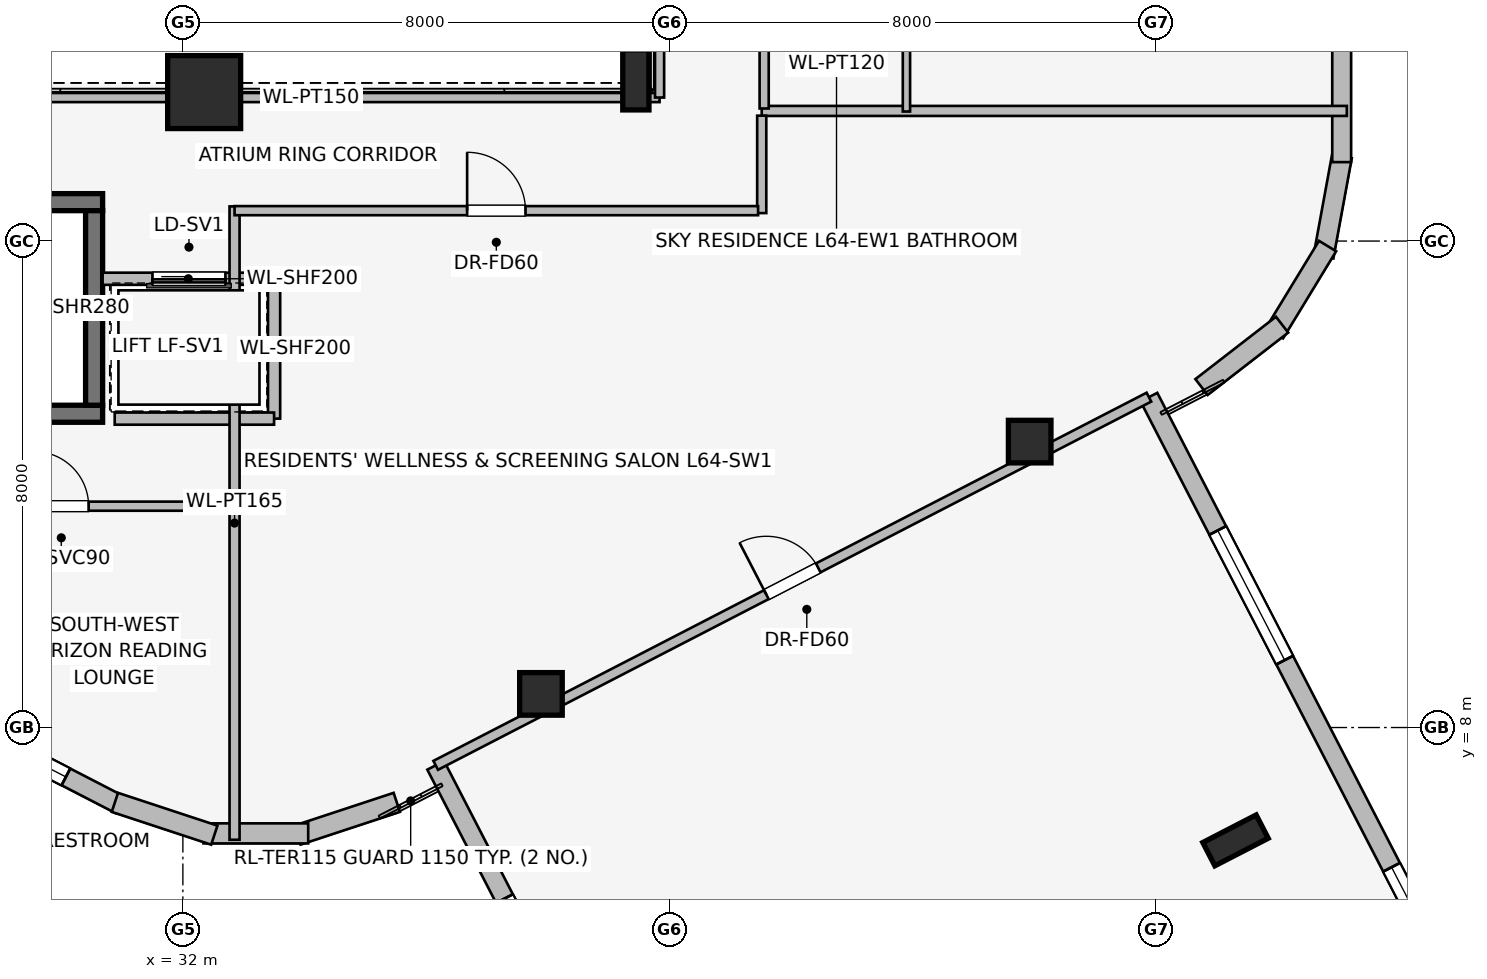
"""IFC4 building model, lengths in metres.
Left out: names, types, materials, properties, quantities, classifications, styles, units other than length and angle.
Written with IfcOpenShell. Run it as: python <this file> out.ifc"""

import sys

from ifc_helpers import new_model, si_unit, direction, frame, frame_2d, origin, origin_2d, place, context, subcontext, project, spatial, rectangle, i_section, extrude, element, fill, save


model = new_model("IFC4")
c1 = context("Model", 3, precision=1e-05, world=origin(), true_north=direction((0.0, 1.0)))
c2 = subcontext(c1, "Body", "Model", "MODEL_VIEW")
j1 = project(units=[si_unit("LENGTHUNIT", "METRE"), si_unit("PLANEANGLEUNIT", "RADIAN")], contexts=[c1])
p1 = place(None, origin())
s1 = spatial("IfcSite", under=j1, at=p1, CompositionType="ELEMENT")
p2 = place(p1, origin())
s2 = spatial("IfcBuilding", under=s1, at=p2, CompositionType="ELEMENT")
p3 = place(p2, frame((0.0, 0.0, 234.8)))
s3 = spatial("IfcBuildingStorey", under=s2, at=p3, CompositionType="ELEMENT", Elevation=234.8)
p4 = place(p3, frame((22.32, 13.16, 0.0), z_axis=(0.0, 0.0, 1.0), x_axis=(1.0, 0.0, 0.0)))
e1 = element("IfcWall", 1, at=p4, inside=s3, PredefinedType="SHEAR", context=c2, shape_type="SweptSolid", body=[
    extrude(rectangle(XDim=8.36, YDim=0.28, at=frame_2d((4.18, 0.0))), origin(), (0.0, 0.0, 1.0), 3.55),
])
p5 = place(p3, frame((30.68, 16.64, 0.0), z_axis=(0.0, 0.0, 1.0), x_axis=(-1.0, 0.0, 0.0)))
e2 = element("IfcWall", 2, at=p5, inside=s3, PredefinedType="SHEAR", context=c2, shape_type="SweptSolid", body=[
    extrude(rectangle(XDim=8.36, YDim=0.28, at=frame_2d((4.18, 0.0))), origin(), (0.0, 0.0, 1.0), 3.55),
])
p6 = place(p5, frame((6.08, 0.0, 0.0)))
e3 = element("IfcOpeningElement", 3, at=p6, cuts=e2, PredefinedType="OPENING", context=c2, shape_type="SweptSolid", body=[
    extrude(rectangle(XDim=1.05, YDim=2.0, at=frame_2d((0.525, 1.0))), frame((0.0, 0.15, 0.0), z_axis=(0.0, -1.0, 0.0), x_axis=(1.0, 0.0, 0.0)), (0.0, 0.0, 1.0), 0.3),
])
p7 = place(p3, frame((30.54, 13.3, 0.0), z_axis=(0.0, 0.0, 1.0), x_axis=(0.0, 1.0, 0.0)))
e4 = element("IfcWall", 4, at=p7, inside=s3, PredefinedType="SHEAR", context=c2, shape_type="SweptSolid", body=[
    extrude(rectangle(XDim=3.2, YDim=0.28, at=frame_2d((1.6, 0.0))), origin(), (0.0, 0.0, 1.0), 3.55),
])
p8 = place(p3, frame((32.35, 18.45, 0.0), z_axis=(0.0, 0.0, 1.0), x_axis=(1.0, 0.0, 0.0)))
e5 = element("IfcColumn", 5, at=p8, inside=s3, PredefinedType="COLUMN", context=c2, shape_type="SweptSolid", body=[
    extrude(rectangle(XDim=1.2, YDim=1.2, at=origin_2d()), origin(), (0.0, 0.0, 1.0), 3.55),
])
for number, where, z_axis, x_axis in (
    (6, (37.889, 8.553, 0.0), (0.0, 0.0, 1.0), (1.0, 0.0, 0.0)),
    (7, (45.927, 12.702, 0.0), (0.0, 0.0, 1.0), (1.0, 0.0, 0.0)),
):
    element("IfcColumn", number, at=place(p3, frame(where, z_axis=z_axis, x_axis=x_axis)), inside=s3, PredefinedType="COLUMN", context=c2, shape_type="SweptSolid", body=[
        extrude(rectangle(XDim=0.7, YDim=0.7, at=origin_2d()), origin(), (0.0, 0.0, 1.0), 3.55),
    ])
p9 = place(p3, frame((39.45, 18.65, 0.0), z_axis=(0.0, 0.0, 1.0), x_axis=(1.0, 0.0, 0.0)))
e8 = element("IfcColumn", 8, at=p9, inside=s3, PredefinedType="COLUMN", context=c2, shape_type="SweptSolid", body=[
    extrude(i_section(OverallWidth=0.431, OverallDepth=0.987, WebThickness=0.034, FlangeThickness=0.062, at=origin_2d()), origin(), (0.0, 0.0, 1.0), 3.55),
])
p10 = place(p3, frame((49.312, 6.144, -0.29), z_axis=(0.0, 0.0, 1.0), x_axis=(0.458711590553, -0.88858521071, 0.0)))
e9 = element("IfcColumn", 9, at=p10, inside=s3, PredefinedType="COLUMN", context=c2, shape_type="SweptSolid", body=[
    extrude(i_section(OverallWidth=0.431, OverallDepth=0.987, WebThickness=0.034, FlangeThickness=0.062, at=origin_2d()), origin(), (0.0, 0.0, 1.0), 3.84),
])
p11 = place(p3, frame((30.963, 6.73, 0.0), z_axis=(0.0, 0.0, 1.0), x_axis=(-0.888581481622, 0.458718814218, 0.0)))
e10 = element("IfcWall", 10, at=p11, inside=s3, PredefinedType="STANDARD", context=c2, shape_type="SweptSolid", body=[
    extrude(rectangle(XDim=15.077, YDim=0.31, at=frame_2d((7.539, 0.0))), origin(), (0.0, 0.0, 1.0), 3.26),
])
p12 = place(p11, frame((0.998, 0.0, 0.75)))
e11 = element("IfcOpeningElement", 11, at=p12, cuts=e10, PredefinedType="OPENING", context=c2, shape_type="SweptSolid", body=[
    extrude(rectangle(XDim=1.05, YDim=1.4, at=frame_2d((0.525, 0.7))), frame((0.0, 0.165, 0.0), z_axis=(0.0, -1.0, 0.0), x_axis=(1.0, 0.0, 0.0)), (0.0, 0.0, 1.0), 0.33),
])
p13 = place(p11, frame((4.176, 0.0, 0.75)))
e12 = element("IfcOpeningElement", 12, at=p13, cuts=e10, PredefinedType="OPENING", context=c2, shape_type="SweptSolid", body=[
    extrude(rectangle(XDim=1.05, YDim=1.4, at=frame_2d((0.525, 0.7))), frame((0.0, 0.165, 0.0), z_axis=(0.0, -1.0, 0.0), x_axis=(1.0, 0.0, 0.0)), (0.0, 0.0, 1.0), 0.33),
])
p14 = place(p11, frame((6.509, 0.0, 0.75)))
e13 = element("IfcOpeningElement", 13, at=p14, cuts=e10, PredefinedType="OPENING", context=c2, shape_type="SweptSolid", body=[
    extrude(rectangle(XDim=1.05, YDim=1.4, at=frame_2d((0.525, 0.7))), frame((0.0, 0.165, 0.0), z_axis=(0.0, -1.0, 0.0), x_axis=(1.0, 0.0, 0.0)), (0.0, 0.0, 1.0), 0.33),
])
p15 = place(p11, frame((8.842, 0.0, 0.75)))
e14 = element("IfcOpeningElement", 14, at=p15, cuts=e10, PredefinedType="OPENING", context=c2, shape_type="SweptSolid", body=[
    extrude(rectangle(XDim=1.05, YDim=1.4, at=frame_2d((0.525, 0.7))), frame((0.0, 0.165, 0.0), z_axis=(0.0, -1.0, 0.0), x_axis=(1.0, 0.0, 0.0)), (0.0, 0.0, 1.0), 0.33),
])
p16 = place(p3, frame((35.518, 6.769, 0.0), z_axis=(0.0, 0.0, 1.0), x_axis=(-0.949713440491, -0.313120393699, 0.0)))
e15 = element("IfcWall", 15, at=p16, inside=s3, PredefinedType="STANDARD", context=c2, shape_type="SweptSolid", body=[
    extrude(rectangle(XDim=1.722, YDim=0.33, at=frame_2d((0.861, 0.0))), origin(), (0.0, 0.0, 1.0), 3.26),
])
p17 = place(p3, frame((34.061, 6.259, 0.0), z_axis=(0.0, 0.0, 1.0), x_axis=(-1.0, 0.0, 0.0)))
e16 = element("IfcWall", 16, at=p17, inside=s3, PredefinedType="STANDARD", context=c2, shape_type="SweptSolid", body=[
    extrude(rectangle(XDim=1.722, YDim=0.33, at=frame_2d((0.861, 0.0))), origin(), (0.0, 0.0, 1.0), 3.26),
])
p18 = place(p3, frame((32.517, 6.23, 0.0), z_axis=(0.0, 0.0, 1.0), x_axis=(-0.949713440491, 0.313120393699, 0.0)))
e17 = element("IfcWall", 17, at=p18, inside=s3, PredefinedType="STANDARD", context=c2, shape_type="SweptSolid", body=[
    extrude(rectangle(XDim=1.722, YDim=0.33, at=frame_2d((0.861, 0.0))), origin(), (0.0, 0.0, 1.0), 3.26),
])
p19 = place(p3, frame((45.241, -10.216, 0.0), z_axis=(0.0, 0.0, 1.0), x_axis=(-0.45873211625, 0.888574614493, 0.0)))
e18 = element("IfcWall", 18, at=p19, inside=s3, PredefinedType="STANDARD", context=c2, shape_type="SweptSolid", body=[
    extrude(rectangle(XDim=19.8, YDim=0.31, at=frame_2d((9.9, 0.0))), origin(), (0.0, 0.0, 1.0), 3.26),
])
p20 = place(p19, frame((2.467, 0.0, 0.75)))
e19 = element("IfcOpeningElement", 19, at=p20, cuts=e18, PredefinedType="OPENING", context=c2, shape_type="SweptSolid", body=[
    extrude(rectangle(XDim=2.4, YDim=1.6, at=frame_2d((1.2, 0.8))), frame((0.0, 0.165, 0.0), z_axis=(0.0, -1.0, 0.0), x_axis=(1.0, 0.0, 0.0)), (0.0, 0.0, 1.0), 0.33),
])
p21 = place(p19, frame((8.7, 0.0, 0.75)))
e20 = element("IfcOpeningElement", 20, at=p21, cuts=e18, PredefinedType="OPENING", context=c2, shape_type="SweptSolid", body=[
    extrude(rectangle(XDim=2.4, YDim=1.6, at=frame_2d((1.2, 0.8))), frame((0.0, 0.165, 0.0), z_axis=(0.0, -1.0, 0.0), x_axis=(1.0, 0.0, 0.0)), (0.0, 0.0, 1.0), 0.33),
])
p22 = place(p19, frame((14.934, 0.0, 0.75)))
e21 = element("IfcOpeningElement", 21, at=p22, cuts=e18, PredefinedType="OPENING", context=c2, shape_type="SweptSolid", body=[
    extrude(rectangle(XDim=2.4, YDim=1.6, at=frame_2d((1.2, 0.8))), frame((0.0, 0.165, 0.0), z_axis=(0.0, -1.0, 0.0), x_axis=(1.0, 0.0, 0.0)), (0.0, 0.0, 1.0), 0.33),
])
p23 = place(p3, frame((47.888, 13.433, 0.0), z_axis=(0.0, 0.0, 1.0), x_axis=(0.458693173014, -0.888594718097, 0.0)))
e22 = element("IfcWall", 22, at=p23, inside=s3, PredefinedType="STANDARD", context=c2, shape_type="SweptSolid", body=[
    extrude(rectangle(XDim=19.8, YDim=0.31, at=frame_2d((9.9, 0.0))), origin(), (0.0, 0.0, 1.0), 3.26),
])
p24 = place(p23, frame((2.467, 0.0, 0.75)))
e23 = element("IfcOpeningElement", 23, at=p24, cuts=e22, PredefinedType="OPENING", context=c2, shape_type="SweptSolid", body=[
    extrude(rectangle(XDim=2.4, YDim=1.6, at=frame_2d((1.2, 0.8))), frame((0.0, 0.165, 0.0), z_axis=(0.0, -1.0, 0.0), x_axis=(1.0, 0.0, 0.0)), (0.0, 0.0, 1.0), 0.33),
])
p25 = place(p23, frame((8.7, 0.0, 0.75)))
e24 = element("IfcOpeningElement", 24, at=p25, cuts=e22, PredefinedType="OPENING", context=c2, shape_type="SweptSolid", body=[
    extrude(rectangle(XDim=2.4, YDim=1.6, at=frame_2d((1.2, 0.8))), frame((0.0, 0.165, 0.0), z_axis=(0.0, -1.0, 0.0), x_axis=(1.0, 0.0, 0.0)), (0.0, 0.0, 1.0), 0.33),
])
p26 = place(p23, frame((14.933, 0.0, 0.75)))
e25 = element("IfcOpeningElement", 25, at=p26, cuts=e22, PredefinedType="OPENING", context=c2, shape_type="SweptSolid", body=[
    extrude(rectangle(XDim=2.4, YDim=1.6, at=frame_2d((1.2, 0.8))), frame((0.0, 0.165, 0.0), z_axis=(0.0, -1.0, 0.0), x_axis=(1.0, 0.0, 0.0)), (0.0, 0.0, 1.0), 0.33),
])
p27 = place(p3, frame((51.062, 17.392, 0.0), z_axis=(0.0, 0.0, 1.0), x_axis=(-0.180691763044, -0.983539773862, 0.0)))
e26 = element("IfcWall", 26, at=p27, inside=s3, PredefinedType="STANDARD", context=c2, shape_type="SweptSolid", body=[
    extrude(rectangle(XDim=1.677, YDim=0.33, at=frame_2d((0.838, 0.0))), origin(), (0.0, 0.0, 1.0), 3.26),
])
p28 = place(p3, frame((50.826, 15.918, 0.0), z_axis=(0.0, 0.0, 1.0), x_axis=(-0.520325409202, -0.853968072318, 0.0)))
e27 = element("IfcWall", 27, at=p28, inside=s3, PredefinedType="STANDARD", context=c2, shape_type="SweptSolid", body=[
    extrude(rectangle(XDim=1.678, YDim=0.33, at=frame_2d((0.839, 0.0))), origin(), (0.0, 0.0, 1.0), 3.26),
])
p29 = place(p3, frame((50.078, 14.625, 0.0), z_axis=(0.0, 0.0, 1.0), x_axis=(-0.790691856293, -0.61221433207, 0.0)))
e28 = element("IfcWall", 28, at=p29, inside=s3, PredefinedType="STANDARD", context=c2, shape_type="SweptSolid", body=[
    extrude(rectangle(XDim=1.676, YDim=0.33, at=frame_2d((0.838, 0.0))), origin(), (0.0, 0.0, 1.0), 3.26),
])
p30 = place(p3, frame((51.058, 30.702, 0.0), z_axis=(0.0, 0.0, 1.0), x_axis=(0.0, -1.0, 0.0)))
e29 = element("IfcWall", 29, at=p30, inside=s3, PredefinedType="STANDARD", context=c2, shape_type="SweptSolid", body=[
    extrude(rectangle(XDim=13.404, YDim=0.31, at=frame_2d((6.702, 0.0))), origin(), (0.0, 0.0, 1.0), 3.26),
])
p31 = place(p30, frame((3.547, 0.0, 0.75)))
e30 = element("IfcOpeningElement", 30, at=p31, cuts=e29, PredefinedType="OPENING", context=c2, shape_type="SweptSolid", body=[
    extrude(rectangle(XDim=1.05, YDim=1.4, at=frame_2d((0.525, 0.7))), frame((0.0, 0.165, 0.0), z_axis=(0.0, -1.0, 0.0), x_axis=(1.0, 0.0, 0.0)), (0.0, 0.0, 1.0), 0.33),
])
p32 = place(p30, frame((6.26, 0.0, 0.75)))
e31 = element("IfcOpeningElement", 31, at=p32, cuts=e29, PredefinedType="OPENING", context=c2, shape_type="SweptSolid", body=[
    extrude(rectangle(XDim=1.05, YDim=1.4, at=frame_2d((0.525, 0.7))), frame((0.0, 0.165, 0.0), z_axis=(0.0, -1.0, 0.0), x_axis=(1.0, 0.0, 0.0)), (0.0, 0.0, 1.0), 0.33),
])
p33 = place(p30, frame((8.868, 0.0, 0.75)))
e32 = element("IfcOpeningElement", 32, at=p33, cuts=e29, PredefinedType="OPENING", context=c2, shape_type="SweptSolid", body=[
    extrude(rectangle(XDim=1.05, YDim=1.4, at=frame_2d((0.525, 0.7))), frame((0.0, 0.165, 0.0), z_axis=(0.0, -1.0, 0.0), x_axis=(1.0, 0.0, 0.0)), (0.0, 0.0, 1.0), 0.33),
])
p34 = place(p3, frame((33.5, 15.38, 0.0), z_axis=(0.0, 0.0, 1.0), x_axis=(-1.0, 0.0, 0.0)))
e33 = element("IfcWall", 33, at=p34, inside=s3, PredefinedType="PARTITIONING", context=c2, shape_type="SweptSolid", body=[
    extrude(rectangle(XDim=2.82, YDim=0.2, at=frame_2d((1.41, 0.0))), origin(), (0.0, 0.0, 1.0), 3.26),
])
p35 = place(p34, frame((0.8, 0.0, 0.0)))
e34 = element("IfcOpeningElement", 34, at=p35, cuts=e33, PredefinedType="OPENING", context=c2, shape_type="SweptSolid", body=[
    extrude(rectangle(XDim=1.2, YDim=2.2, at=frame_2d((0.6, 1.1))), frame((0.0, 0.11, 0.0), z_axis=(0.0, -1.0, 0.0), x_axis=(1.0, 0.0, 0.0)), (0.0, 0.0, 1.0), 0.22),
])
p36 = place(p3, frame((33.5, 13.08, 0.0), z_axis=(0.0, 0.0, 1.0), x_axis=(0.0, 1.0, 0.0)))
e35 = element("IfcWall", 35, at=p36, inside=s3, PredefinedType="PARTITIONING", context=c2, shape_type="SweptSolid", body=[
    extrude(rectangle(XDim=2.3, YDim=0.2, at=frame_2d((1.15, 0.0))), origin(), (0.0, 0.0, 1.0), 3.26),
])
p37 = place(p3, frame((30.879, 13.08, 0.0), z_axis=(0.0, 0.0, 1.0), x_axis=(1.0, 0.0, 0.0)))
e36 = element("IfcWall", 36, at=p37, inside=s3, PredefinedType="PARTITIONING", context=c2, shape_type="SweptSolid", body=[
    extrude(rectangle(XDim=2.621, YDim=0.2, at=frame_2d((1.311, 0.0))), origin(), (0.0, 0.0, 1.0), 3.26),
])
p38 = place(p3, frame((27.675, 18.36, 0.0), z_axis=(0.0, 0.0, 1.0), x_axis=(1.0, 0.0, 0.0)))
e37 = element("IfcWall", 37, at=p38, inside=s3, PredefinedType="PARTITIONING", context=c2, shape_type="SweptSolid", body=[
    extrude(rectangle(XDim=12.165, YDim=0.15, at=frame_2d((6.083, 0.0))), origin(), (0.0, 0.0, 1.0), 2.401),
])
p39 = place(p3, frame((39.84, 18.36, 0.0), z_axis=(0.0, 0.0, 1.0), x_axis=(0.0, 1.0, 0.0)))
e38 = element("IfcWall", 38, at=p39, inside=s3, PredefinedType="PARTITIONING", context=c2, shape_type="SweptSolid", body=[
    extrude(rectangle(XDim=11.28, YDim=0.15, at=frame_2d((5.64, 0.0))), origin(), (0.0, 0.0, 1.0), 3.26),
])
p40 = place(p3, frame((32.85, 6.154, 0.0), z_axis=(0.0, 0.0, 1.0), x_axis=(0.0, 1.0, 0.0)))
e39 = element("IfcWall", 39, at=p40, inside=s3, PredefinedType="PARTITIONING", context=c2, shape_type="SweptSolid", body=[
    extrude(rectangle(XDim=10.416, YDim=0.165, at=frame_2d((5.208, 0.0))), origin(), (0.0, 0.0, 1.0), 3.26),
])
p41 = place(p3, frame((21.244, 11.64, 0.0), z_axis=(0.0, 0.0, 1.0), x_axis=(1.0, 0.0, 0.0)))
e40 = element("IfcWall", 40, at=p41, inside=s3, PredefinedType="PARTITIONING", context=c2, shape_type="SweptSolid", body=[
    extrude(rectangle(XDim=11.606, YDim=0.15, at=frame_2d((5.803, 0.0))), origin(), (0.0, 0.0, 1.0), 3.26),
])
p42 = place(p41, frame((4.856, 0.0, 0.0)))
e41 = element("IfcOpeningElement", 41, at=p42, cuts=e40, PredefinedType="OPENING", context=c2, shape_type="SweptSolid", body=[
    extrude(rectangle(XDim=0.9, YDim=2.0, at=frame_2d((0.45, 1.0))), frame((0.0, 0.085, 0.0), z_axis=(0.0, -1.0, 0.0), x_axis=(1.0, 0.0, 0.0)), (0.0, 0.0, 1.0), 0.17),
])
p43 = place(p41, frame((8.306, 0.0, 0.0)))
e42 = element("IfcOpeningElement", 42, at=p43, cuts=e40, PredefinedType="OPENING", context=c2, shape_type="SweptSolid", body=[
    extrude(rectangle(XDim=0.9, YDim=2.0, at=frame_2d((0.45, 1.0))), frame((0.0, 0.085, 0.0), z_axis=(0.0, -1.0, 0.0), x_axis=(1.0, 0.0, 0.0)), (0.0, 0.0, 1.0), 0.17),
])
p44 = place(p3, frame((41.52, 18.14, 0.0), z_axis=(0.0, 0.0, 1.0), x_axis=(1.0, 0.0, 0.0)))
e43 = element("IfcWall", 43, at=p44, inside=s3, PredefinedType="PARTITIONING", context=c2, shape_type="SweptSolid", body=[
    extrude(rectangle(XDim=9.623, YDim=0.165, at=frame_2d((4.812, 0.0))), origin(), (0.0, 0.0, 1.0), 3.26),
])
p45 = place(p3, frame((43.9, 18.13, 0.0), z_axis=(0.0, 0.0, 1.0), x_axis=(0.0, 1.0, 0.0)))
e44 = element("IfcWall", 44, at=p45, inside=s3, PredefinedType="PARTITIONING", context=c2, shape_type="SweptSolid", body=[
    extrude(rectangle(XDim=4.389, YDim=0.12, at=frame_2d((2.195, 0.0))), origin(), (0.0, 0.0, 1.0), 3.26),
])
p46 = place(p3, frame((41.56, 18.18, 0.0), z_axis=(0.0, 0.0, 1.0), x_axis=(0.0, 1.0, 0.0)))
e45 = element("IfcWall", 45, at=p46, inside=s3, PredefinedType="PARTITIONING", context=c2, shape_type="SweptSolid", body=[
    extrude(rectangle(XDim=7.199, YDim=0.15, at=frame_2d((3.6, 0.0))), origin(), (0.0, 0.0, 1.0), 3.26),
])
p47 = place(p46, frame((4.37, 0.0, 0.0)))
e46 = element("IfcOpeningElement", 46, at=p47, cuts=e45, PredefinedType="OPENING", context=c2, shape_type="SweptSolid", body=[
    extrude(rectangle(XDim=0.96, YDim=2.0, at=frame_2d((0.48, 1.0))), frame((0.0, 0.085, 0.0), z_axis=(0.0, -1.0, 0.0), x_axis=(1.0, 0.0, 0.0)), (0.0, 0.0, 1.0), 0.17),
])
p48 = place(p3, frame((41.52, 16.46, 0.0), z_axis=(0.0, 0.0, 1.0), x_axis=(0.0, 1.0, 0.0)))
e47 = element("IfcWall", 47, at=p48, inside=s3, PredefinedType="PARTITIONING", context=c2, shape_type="SweptSolid", body=[
    extrude(rectangle(XDim=1.602, YDim=0.15, at=frame_2d((0.801, 0.0))), origin(), (0.0, 0.0, 1.0), 3.26),
])
p49 = place(p3, frame((32.85, 16.5, 0.0), z_axis=(0.0, 0.0, 1.0), x_axis=(1.0, 0.0, 0.0)))
e48 = element("IfcWall", 48, at=p49, inside=s3, PredefinedType="PARTITIONING", context=c2, shape_type="SweptSolid", body=[
    extrude(rectangle(XDim=8.61, YDim=0.15, at=frame_2d((4.305, 0.0))), origin(), (0.0, 0.0, 1.0), 3.26),
])
p50 = place(p49, frame((3.825, 0.0, 0.0)))
e49 = element("IfcOpeningElement", 49, at=p50, cuts=e48, PredefinedType="OPENING", context=c2, shape_type="SweptSolid", body=[
    extrude(rectangle(XDim=0.96, YDim=2.0, at=frame_2d((0.48, 1.0))), frame((0.0, 0.085, 0.0), z_axis=(0.0, -1.0, 0.0), x_axis=(1.0, 0.0, 0.0)), (0.0, 0.0, 1.0), 0.17),
])
p51 = place(p3, frame((36.158, 7.378, 0.0), z_axis=(0.0, 0.0, 1.0), x_axis=(0.88859001822, 0.458702277648, 0.0)))
e50 = element("IfcWall", 50, at=p51, inside=s3, PredefinedType="PARTITIONING", context=c2, shape_type="SweptSolid", body=[
    extrude(rectangle(XDim=13.201, YDim=0.165, at=frame_2d((6.6, 0.0))), origin(), (0.0, 0.0, 1.0), 2.711),
])
p52 = place(p51, frame((6.12, 0.0, 0.0)))
e51 = element("IfcOpeningElement", 51, at=p52, cuts=e50, PredefinedType="OPENING", context=c2, shape_type="SweptSolid", body=[
    extrude(rectangle(XDim=0.96, YDim=2.0, at=frame_2d((0.48, 1.0))), frame((0.0, 0.093, 0.0), z_axis=(0.0, -1.0, 0.0), x_axis=(1.0, 0.0, 0.0)), (0.0, 0.0, 1.0), 0.185),
])
p53 = place(p12, origin())
e52 = element("IfcWindow", 52, at=p53, inside=s3, PartitioningType="SINGLE_PANEL", PredefinedType="WINDOW", context=c2, shape_type="SweptSolid", body=[
    extrude(rectangle(XDim=1.05, YDim=1.4, at=frame_2d((0.525, 0.7))), frame((0.0, 0.03, 0.0), z_axis=(0.0, -1.0, 0.0), x_axis=(1.0, 0.0, 0.0)), (0.0, 0.0, 1.0), 0.06),
])
fill(e11, e52)
p54 = place(p22, origin())
e53 = element("IfcWindow", 53, at=p54, inside=s3, PartitioningType="SINGLE_PANEL", PredefinedType="WINDOW", context=c2, shape_type="SweptSolid", body=[
    extrude(rectangle(XDim=2.4, YDim=1.6, at=frame_2d((1.2, 0.8))), frame((0.0, 0.03, 0.0), z_axis=(0.0, -1.0, 0.0), x_axis=(1.0, 0.0, 0.0)), (0.0, 0.0, 1.0), 0.06),
])
fill(e21, e53)
p55 = place(p24, origin())
e54 = element("IfcWindow", 54, at=p55, inside=s3, PartitioningType="SINGLE_PANEL", PredefinedType="WINDOW", context=c2, shape_type="SweptSolid", body=[
    extrude(rectangle(XDim=2.4, YDim=1.6, at=frame_2d((1.2, 0.8))), frame((0.0, 0.03, 0.0), z_axis=(0.0, -1.0, 0.0), x_axis=(1.0, 0.0, 0.0)), (0.0, 0.0, 1.0), 0.06),
])
fill(e23, e54)
p56 = place(p25, origin())
e55 = element("IfcWindow", 55, at=p56, inside=s3, PartitioningType="SINGLE_PANEL", PredefinedType="WINDOW", context=c2, shape_type="SweptSolid", body=[
    extrude(rectangle(XDim=2.4, YDim=1.6, at=frame_2d((1.2, 0.8))), frame((0.0, 0.03, 0.0), z_axis=(0.0, -1.0, 0.0), x_axis=(1.0, 0.0, 0.0)), (0.0, 0.0, 1.0), 0.06),
])
fill(e24, e55)
p57 = place(p35, origin())
e56 = element("IfcDoor", 56, at=p57, inside=s3, OperationType="SLIDING_TO_RIGHT", PredefinedType="DOOR", context=c2, shape_type="SweptSolid", body=[
    extrude(rectangle(XDim=1.2, YDim=2.2, at=frame_2d((0.6, 1.1))), frame((0.0, 0.025, 0.0), z_axis=(0.0, -1.0, 0.0), x_axis=(1.0, 0.0, 0.0)), (0.0, 0.0, 1.0), 0.05),
])
fill(e34, e56)
p58 = place(p43, origin())
e57 = element("IfcDoor", 57, at=p58, inside=s3, OperationType="SINGLE_SWING_LEFT", PredefinedType="DOOR", context=c2, shape_type="SweptSolid", body=[
    extrude(rectangle(XDim=0.9, YDim=2.0, at=frame_2d((0.45, 1.0))), frame((0.0, 0.025, 0.0), z_axis=(0.0, -1.0, 0.0), x_axis=(1.0, 0.0, 0.0)), (0.0, 0.0, 1.0), 0.05),
])
fill(e42, e57)
p59 = place(p50, origin())
e58 = element("IfcDoor", 58, at=p59, inside=s3, OperationType="SINGLE_SWING_LEFT", PredefinedType="DOOR", context=c2, shape_type="SweptSolid", body=[
    extrude(rectangle(XDim=0.96, YDim=2.0, at=frame_2d((0.48, 1.0))), frame((0.0, 0.025, 0.0), z_axis=(0.0, -1.0, 0.0), x_axis=(1.0, 0.0, 0.0)), (0.0, 0.0, 1.0), 0.05),
])
fill(e49, e58)
p60 = place(p52, origin())
e59 = element("IfcDoor", 59, at=p60, inside=s3, OperationType="SINGLE_SWING_LEFT", PredefinedType="DOOR", context=c2, shape_type="SweptSolid", body=[
    extrude(rectangle(XDim=0.96, YDim=2.0, at=frame_2d((0.48, 1.0))), frame((0.0, 0.025, 0.0), z_axis=(0.0, -1.0, 0.0), x_axis=(1.0, 0.0, 0.0)), (0.0, 0.0, 1.0), 0.05),
])
fill(e51, e59)
save(model, sys.argv[1])
